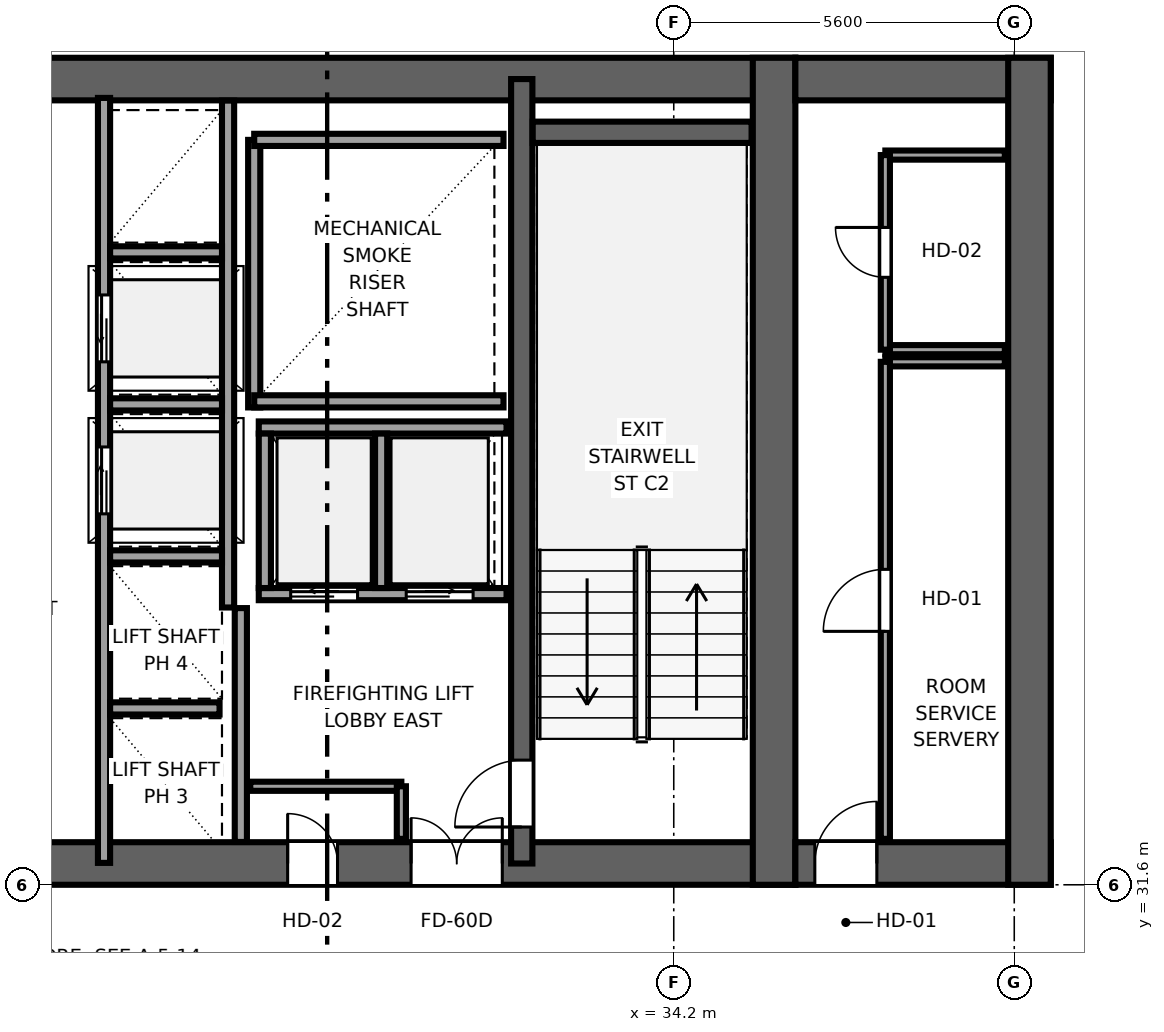
"""IFC4 building model, lengths in metres.
Left out: names, types, materials, properties, quantities, classifications, styles, units other than length and angle.
Written with IfcOpenShell. Run it as: python <this file> out.ifc"""

import sys

from ifc_helpers import new_model, si_unit, direction, frame, frame_2d, origin, place, context, subcontext, project, spatial, rectangle, extrude, source, transform, mapped, element, fill, save


model = new_model("IFC4")
c1 = context("Model", 3, precision=1e-05, world=origin(), true_north=direction((0.0, 1.0)))
c2 = subcontext(c1, "Body", "Model", "MODEL_VIEW")
j1 = project(units=[si_unit("LENGTHUNIT", "METRE"), si_unit("PLANEANGLEUNIT", "RADIAN")], contexts=[c1])
p1 = place(None, origin())
s1 = spatial("IfcSite", under=j1, at=p1, CompositionType="ELEMENT")
p2 = place(p1, origin())
s2 = spatial("IfcBuilding", under=s1, at=p2, CompositionType="ELEMENT")
p3 = place(p2, frame((0.0, 0.0, 201.75)))
s3 = spatial("IfcBuildingStorey", under=s2, at=p3, CompositionType="ELEMENT", Elevation=201.75)
p4 = place(p3, frame((9.8, 31.95, 0.0), z_axis=(0.0, 0.0, 1.0), x_axis=(1.0, 0.0, 0.0)))
e1 = element("IfcWall", 1, at=p4, inside=s3, PredefinedType="SHEAR", context=c2, shape_type="SweptSolid", body=[
    extrude(rectangle(XDim=26.4, YDim=0.7, at=frame_2d((13.2, 0.0))), origin(), (0.0, 0.0, 1.0), 3.55),
])
p5 = place(p4, frame((6.32, 0.0, 0.0), z_axis=(0.0, 0.0, 1.0), x_axis=(-1.0, 0.0, 0.0)))
e2 = element("IfcOpeningElement", 2, at=p5, cuts=e1, PredefinedType="OPENING", context=c2, shape_type="SweptSolid", body=[
    extrude(rectangle(XDim=1.5, YDim=2.04, at=frame_2d((0.75, 1.02))), frame((0.0, 0.36, 0.0), z_axis=(0.0, -1.0, 0.0), x_axis=(1.0, 0.0, 0.0)), (0.0, 0.0, 1.0), 0.72),
])
p6 = place(p4, frame((13.95, 0.0, 0.0), z_axis=(0.0, 0.0, 1.0), x_axis=(-1.0, 0.0, 0.0)))
e3 = element("IfcOpeningElement", 3, at=p6, cuts=e1, PredefinedType="OPENING", context=c2, shape_type="SweptSolid", body=[
    extrude(rectangle(XDim=1.5, YDim=2.04, at=frame_2d((0.75, 1.02))), frame((0.0, 0.36, 0.0), z_axis=(0.0, -1.0, 0.0), x_axis=(1.0, 0.0, 0.0)), (0.0, 0.0, 1.0), 0.72),
])
p7 = place(p4, frame((21.58, 0.0, 0.0), z_axis=(0.0, 0.0, 1.0), x_axis=(-1.0, 0.0, 0.0)))
e4 = element("IfcOpeningElement", 4, at=p7, cuts=e1, PredefinedType="OPENING", context=c2, shape_type="SweptSolid", body=[
    extrude(rectangle(XDim=1.5, YDim=2.04, at=frame_2d((0.75, 1.02))), frame((0.0, 0.36, 0.0), z_axis=(0.0, -1.0, 0.0), x_axis=(1.0, 0.0, 0.0)), (0.0, 0.0, 1.0), 0.72),
])
p8 = place(p4, frame((8.37, 0.0, 0.0), z_axis=(0.0, 0.0, 1.0), x_axis=(-1.0, 0.0, 0.0)))
e5 = element("IfcOpeningElement", 5, at=p8, cuts=e1, PredefinedType="OPENING", context=c2, shape_type="SweptSolid", body=[
    extrude(rectangle(XDim=0.82, YDim=2.01, at=frame_2d((0.41, 1.005))), frame((0.0, 0.36, 0.0), z_axis=(0.0, -1.0, 0.0), x_axis=(1.0, 0.0, 0.0)), (0.0, 0.0, 1.0), 0.72),
])
p9 = place(p4, frame((18.87, 0.0, 0.0), z_axis=(0.0, 0.0, 1.0), x_axis=(-1.0, 0.0, 0.0)))
e6 = element("IfcOpeningElement", 6, at=p9, cuts=e1, PredefinedType="OPENING", context=c2, shape_type="SweptSolid", body=[
    extrude(rectangle(XDim=0.82, YDim=2.01, at=frame_2d((0.41, 1.005))), frame((0.0, 0.36, 0.0), z_axis=(0.0, -1.0, 0.0), x_axis=(1.0, 0.0, 0.0)), (0.0, 0.0, 1.0), 0.72),
])
p10 = place(p3, frame((9.8, 44.85, 0.0), z_axis=(0.0, 0.0, 1.0), x_axis=(1.0, 0.0, 0.0)))
e7 = element("IfcWall", 7, at=p10, inside=s3, PredefinedType="SHEAR", context=c2, shape_type="SweptSolid", body=[
    extrude(rectangle(XDim=26.4, YDim=0.7, at=frame_2d((13.2, 0.0))), origin(), (0.0, 0.0, 1.0), 3.55),
])
p11 = place(p3, frame((35.85, 31.6, 0.0), z_axis=(0.0, 0.0, 1.0), x_axis=(0.0, 1.0, 0.0)))
e8 = element("IfcWall", 8, at=p11, inside=s3, PredefinedType="SHEAR", context=c2, shape_type="SweptSolid", body=[
    extrude(rectangle(XDim=13.6, YDim=0.7, at=frame_2d((6.8, 0.0))), origin(), (0.0, 0.0, 1.0), 3.55),
])
p12 = place(p3, frame((31.7, 31.95, 0.0), z_axis=(0.0, 0.0, 1.0), x_axis=(0.0, 1.0, 0.0)))
e9 = element("IfcWall", 9, at=p12, inside=s3, PredefinedType="SHEAR", context=c2, shape_type="SweptSolid", body=[
    extrude(rectangle(XDim=12.9, YDim=0.35, at=frame_2d((6.45, 0.0))), origin(), (0.0, 0.0, 1.0), 3.55),
])
p13 = place(p12, frame((1.7, 0.0, 0.0), z_axis=(0.0, 0.0, 1.0), x_axis=(-1.0, 0.0, 0.0)))
e10 = element("IfcOpeningElement", 10, at=p13, cuts=e9, PredefinedType="OPENING", context=c2, shape_type="SweptSolid", body=[
    extrude(rectangle(XDim=1.1, YDim=2.12, at=frame_2d((0.55, 1.06))), frame((0.0, 0.185, 0.0), z_axis=(0.0, -1.0, 0.0), x_axis=(1.0, 0.0, 0.0)), (0.0, 0.0, 1.0), 0.37),
])
p14 = place(p3, frame((36.2, 31.95, 0.0), z_axis=(0.0, 0.0, 1.0), x_axis=(1.0, 0.0, 0.0)))
e11 = element("IfcWall", 11, at=p14, inside=s3, PredefinedType="SHEAR", context=c2, shape_type="SweptSolid", body=[
    extrude(rectangle(XDim=4.2, YDim=0.7, at=frame_2d((2.1, 0.0))), origin(), (0.0, 0.0, 1.0), 3.55),
])
p15 = place(p14, frame((1.34, 0.0, 0.0), z_axis=(0.0, 0.0, 1.0), x_axis=(-1.0, 0.0, 0.0)))
e12 = element("IfcOpeningElement", 12, at=p15, cuts=e11, PredefinedType="OPENING", context=c2, shape_type="SweptSolid", body=[
    extrude(rectangle(XDim=1.02, YDim=2.03, at=frame_2d((0.51, 1.015))), frame((0.0, 0.36, 0.0), z_axis=(0.0, -1.0, 0.0), x_axis=(1.0, 0.0, 0.0)), (0.0, 0.0, 1.0), 0.72),
])
p16 = place(p3, frame((36.2, 44.85, 0.0), z_axis=(0.0, 0.0, 1.0), x_axis=(1.0, 0.0, 0.0)))
e13 = element("IfcWall", 13, at=p16, inside=s3, PredefinedType="SHEAR", context=c2, shape_type="SweptSolid", body=[
    extrude(rectangle(XDim=4.2, YDim=0.7, at=frame_2d((2.1, 0.0))), origin(), (0.0, 0.0, 1.0), 3.55),
])
p17 = place(p3, frame((40.05, 31.6, 0.0), z_axis=(0.0, 0.0, 1.0), x_axis=(0.0, 1.0, 0.0)))
e14 = element("IfcWall", 14, at=p17, inside=s3, PredefinedType="SHEAR", context=c2, shape_type="SweptSolid", body=[
    extrude(rectangle(XDim=13.6, YDim=0.7, at=frame_2d((6.8, 0.0))), origin(), (0.0, 0.0, 1.0), 3.55),
])
p18 = place(p3, frame((31.88, 43.975, 0.0), z_axis=(0.0, 0.0, 1.0), x_axis=(1.0, 0.0, 0.0)))
e15 = element("IfcWall", 15, at=p18, inside=s3, PredefinedType="SHEAR", context=c2, shape_type="SweptSolid", body=[
    extrude(rectangle(XDim=3.6, YDim=0.35, at=frame_2d((1.8, 0.0))), origin(), (0.0, 0.0, 1.0), 3.55),
])
p19 = place(p3, frame((27.3, 39.45, 0.0), z_axis=(0.0, 0.0, 1.0), x_axis=(0.0, 1.0, 0.0)))
e16 = element("IfcWall", 16, at=p19, inside=s3, PredefinedType="SOLIDWALL", context=c2, shape_type="SweptSolid", body=[
    extrude(rectangle(XDim=4.4, YDim=0.2, at=frame_2d((2.2, 0.0))), origin(), (0.0, 0.0, 1.0), 3.29),
])
for number, where, z_axis, x_axis in (
    (17, (27.3, 39.55, 0.0), (0.0, 0.0, 1.0), (1.0, 0.0, 0.0)),
    (18, (27.3, 43.85, 0.0), (0.0, 0.0, 1.0), (1.0, 0.0, 0.0)),
):
    element("IfcWall", number, at=place(p3, frame(where, z_axis=z_axis, x_axis=x_axis)), inside=s3, PredefinedType="SOLIDWALL", context=c2, shape_type="SweptSolid", body=[
        extrude(rectangle(XDim=4.1, YDim=0.2, at=frame_2d((2.05, 0.0))), origin(), (0.0, 0.0, 1.0), 3.29),
    ])
p20 = place(p3, frame((27.08, 32.304, 0.0), z_axis=(0.0, 0.0, 1.0), x_axis=(0.0, 1.0, 0.0)))
e19 = element("IfcWall", 19, at=p20, inside=s3, PredefinedType="SOLIDWALL", context=c2, shape_type="SweptSolid", body=[
    extrude(rectangle(XDim=3.846, YDim=0.2, at=frame_2d((1.923, 0.0))), origin(), (0.0, 0.0, 1.0), 3.29),
])
p21 = place(p3, frame((27.375, 36.38, 0.0), z_axis=(0.0, 0.0, 1.0), x_axis=(1.0, 0.0, 0.0)))
e20 = element("IfcWall", 20, at=p21, inside=s3, PredefinedType="SOLIDWALL", context=c2, shape_type="SweptSolid", body=[
    extrude(rectangle(XDim=4.075, YDim=0.2, at=frame_2d((2.038, 0.0))), origin(), (0.0, 0.0, 1.0), 3.29),
])
p22 = place(p21, frame((0.525, 0.0, 0.0)))
e21 = element("IfcOpeningElement", 21, at=p22, cuts=e20, PredefinedType="OPENING", context=c2, shape_type="SweptSolid", body=[
    extrude(rectangle(XDim=1.1, YDim=2.12, at=frame_2d((0.55, 1.06))), frame((0.0, 0.11, 0.0), z_axis=(0.0, -1.0, 0.0), x_axis=(1.0, 0.0, 0.0)), (0.0, 0.0, 1.0), 0.22),
])
p23 = place(p21, frame((2.425, 0.0, 0.0)))
e22 = element("IfcOpeningElement", 22, at=p23, cuts=e20, PredefinedType="OPENING", context=c2, shape_type="SweptSolid", body=[
    extrude(rectangle(XDim=1.1, YDim=2.12, at=frame_2d((0.55, 1.06))), frame((0.0, 0.11, 0.0), z_axis=(0.0, -1.0, 0.0), x_axis=(1.0, 0.0, 0.0)), (0.0, 0.0, 1.0), 0.22),
])
p24 = place(p3, frame((27.375, 39.12, 0.0), z_axis=(0.0, 0.0, 1.0), x_axis=(1.0, 0.0, 0.0)))
e23 = element("IfcWall", 23, at=p24, inside=s3, PredefinedType="SOLIDWALL", context=c2, shape_type="SweptSolid", body=[
    extrude(rectangle(XDim=4.075, YDim=0.2, at=frame_2d((2.038, 0.0))), origin(), (0.0, 0.0, 1.0), 3.29),
])
for number, where, z_axis, x_axis in (
    (24, (27.475, 36.48, 0.0), (0.0, 0.0, 1.0), (0.0, 1.0, 0.0)),
    (25, (29.387, 36.48, 0.0), (0.0, 0.0, 1.0), (0.0, 1.0, 0.0)),
):
    element("IfcWall", number, at=place(p3, frame(where, z_axis=z_axis, x_axis=x_axis)), inside=s3, PredefinedType="SOLIDWALL", context=c2, shape_type="SweptSolid", body=[
        extrude(rectangle(XDim=2.54, YDim=0.2, at=frame_2d((1.27, 0.0))), origin(), (0.0, 0.0, 1.0), 3.29),
    ])
p25 = place(p3, frame((24.83, 31.96, 0.0), z_axis=(0.0, 0.0, 1.0), x_axis=(0.0, 1.0, 0.0)))
e26 = element("IfcWall", 26, at=p25, inside=s3, PredefinedType="SOLIDWALL", context=c2, shape_type="SweptSolid", body=[
    extrude(rectangle(XDim=12.58, YDim=0.2, at=frame_2d((6.29, 0.0))), origin(), (0.0, 0.0, 1.0), 3.29),
])
p26 = place(p25, frame((5.74, 0.0, 0.0)))
e27 = element("IfcOpeningElement", 27, at=p26, cuts=e26, PredefinedType="OPENING", context=c2, shape_type="SweptSolid", body=[
    extrude(rectangle(XDim=1.1, YDim=2.12, at=frame_2d((0.55, 1.06))), frame((0.0, 0.11, 0.0), z_axis=(0.0, -1.0, 0.0), x_axis=(1.0, 0.0, 0.0)), (0.0, 0.0, 1.0), 0.22),
])
p27 = place(p25, frame((8.24, 0.0, 0.0)))
e28 = element("IfcOpeningElement", 28, at=p27, cuts=e26, PredefinedType="OPENING", context=c2, shape_type="SweptSolid", body=[
    extrude(rectangle(XDim=1.1, YDim=2.12, at=frame_2d((0.55, 1.06))), frame((0.0, 0.11, 0.0), z_axis=(0.0, -1.0, 0.0), x_axis=(1.0, 0.0, 0.0)), (0.0, 0.0, 1.0), 0.22),
])
p28 = place(p3, frame((26.87, 36.16, 0.0), z_axis=(0.0, 0.0, 1.0), x_axis=(0.0, 1.0, 0.0)))
e29 = element("IfcWall", 29, at=p28, inside=s3, PredefinedType="SOLIDWALL", context=c2, shape_type="SweptSolid", body=[
    extrude(rectangle(XDim=8.336, YDim=0.2, at=frame_2d((4.168, 0.0))), origin(), (0.0, 0.0, 1.0), 3.29),
])
p29 = place(p3, frame((24.93, 34.5, 0.0), z_axis=(0.0, 0.0, 1.0), x_axis=(1.0, 0.0, 0.0)))
e30 = element("IfcWall", 30, at=p29, inside=s3, PredefinedType="SOLIDWALL", context=c2, shape_type="SweptSolid", body=[
    extrude(rectangle(XDim=1.8, YDim=0.2, at=frame_2d((0.9, 0.0))), origin(), (0.0, 0.0, 1.0), 3.29),
])
for number, where, z_axis, x_axis in (
    (31, (24.93, 37.0, 0.0), (0.0, 0.0, 1.0), (1.0, 0.0, 0.0)),
    (32, (24.93, 39.5, 0.0), (0.0, 0.0, 1.0), (1.0, 0.0, 0.0)),
    (33, (24.93, 42.0, 0.0), (0.0, 0.0, 1.0), (1.0, 0.0, 0.0)),
):
    element("IfcWall", number, at=place(p3, frame(where, z_axis=z_axis, x_axis=x_axis)), inside=s3, PredefinedType="SOLIDWALL", context=c2, shape_type="SweptSolid", body=[
        extrude(rectangle(XDim=1.84, YDim=0.2, at=frame_2d((0.92, 0.0))), origin(), (0.0, 0.0, 1.0), 3.29),
    ])
p30 = place(p3, frame((27.235, 33.22, 0.0), z_axis=(0.0, 0.0, 1.0), x_axis=(1.0, 0.0, 0.0)))
e34 = element("IfcWall", 34, at=p30, inside=s3, PredefinedType="PARTITIONING", context=c2, shape_type="SweptSolid", body=[
    extrude(rectangle(XDim=2.485, YDim=0.15, at=frame_2d((1.242, 0.0))), origin(), (0.0, 0.0, 1.0), 3.29),
])
p31 = place(p3, frame((29.72, 32.355, 0.0), z_axis=(0.0, 0.0, 1.0), x_axis=(0.0, 1.0, 0.0)))
e35 = element("IfcWall", 35, at=p31, inside=s3, PredefinedType="PARTITIONING", context=c2, shape_type="SweptSolid", body=[
    extrude(rectangle(XDim=0.865, YDim=0.15, at=frame_2d((0.433, 0.0))), origin(), (0.0, 0.0, 1.0), 3.29),
])
p32 = place(p3, frame((37.68, 40.2, 0.0), z_axis=(0.0, 0.0, 1.0), x_axis=(1.0, 0.0, 0.0)))
e36 = element("IfcWall", 36, at=p32, inside=s3, PredefinedType="PARTITIONING", context=c2, shape_type="SweptSolid", body=[
    extrude(rectangle(XDim=1.965, YDim=0.15, at=frame_2d((0.982, 0.0))), origin(), (0.0, 0.0, 1.0), 3.29),
])
p33 = place(p3, frame((37.68, 32.355, 0.0), z_axis=(0.0, 0.0, 1.0), x_axis=(0.0, 1.0, 0.0)))
e37 = element("IfcWall", 37, at=p33, inside=s3, PredefinedType="PARTITIONING", context=c2, shape_type="SweptSolid", body=[
    extrude(rectangle(XDim=7.845, YDim=0.15, at=frame_2d((3.922, 0.0))), origin(), (0.0, 0.0, 1.0), 3.29),
])
p34 = place(p33, frame((3.413, 0.0, 0.0)))
e38 = element("IfcOpeningElement", 38, at=p34, cuts=e37, PredefinedType="OPENING", context=c2, shape_type="SweptSolid", body=[
    extrude(rectangle(XDim=1.02, YDim=2.03, at=frame_2d((0.51, 1.015))), frame((0.0, 0.085, 0.0), z_axis=(0.0, -1.0, 0.0), x_axis=(1.0, 0.0, 0.0)), (0.0, 0.0, 1.0), 0.17),
])
for number, where, z_axis, x_axis in (
    (39, (37.68, 40.4, 0.0), (0.0, 0.0, 1.0), (1.0, 0.0, 0.0)),
    (40, (37.68, 43.6, 0.0), (0.0, 0.0, 1.0), (1.0, 0.0, 0.0)),
):
    element("IfcWall", number, at=place(p3, frame(where, z_axis=z_axis, x_axis=x_axis)), inside=s3, PredefinedType="PARTITIONING", context=c2, shape_type="SweptSolid", body=[
        extrude(rectangle(XDim=1.965, YDim=0.15, at=frame_2d((0.982, 0.0))), origin(), (0.0, 0.0, 1.0), 3.29),
    ])
p35 = place(p3, frame((37.68, 40.4, 0.0), z_axis=(0.0, 0.0, 1.0), x_axis=(0.0, 1.0, 0.0)))
e41 = element("IfcWall", 41, at=p35, inside=s3, PredefinedType="PARTITIONING", context=c2, shape_type="SweptSolid", body=[
    extrude(rectangle(XDim=3.2, YDim=0.15, at=frame_2d((1.6, 0.0))), origin(), (0.0, 0.0, 1.0), 3.29),
])
p36 = place(p35, frame((1.19, 0.0, 0.0)))
e42 = element("IfcOpeningElement", 42, at=p36, cuts=e41, PredefinedType="OPENING", context=c2, shape_type="SweptSolid", body=[
    extrude(rectangle(XDim=0.82, YDim=2.01, at=frame_2d((0.41, 1.005))), frame((0.0, 0.085, 0.0), z_axis=(0.0, -1.0, 0.0), x_axis=(1.0, 0.0, 0.0)), (0.0, 0.0, 1.0), 0.17),
])
m1 = source(origin(), c2, "Body", "SweptSolid", [
    extrude(rectangle(XDim=1.1, YDim=2.12, at=frame_2d((0.55, 1.06))), frame((0.0, 0.025, 0.0), z_axis=(0.0, -1.0, 0.0), x_axis=(1.0, 0.0, 0.0)), (0.0, 0.0, 1.0), 0.05),
])
p37 = place(p13, origin())
e43 = element("IfcDoor", 43, at=p37, inside=s3, OperationType="SINGLE_SWING_LEFT", PredefinedType="DOOR", context=c2, shape_type="MappedRepresentation", body=[
    mapped(m1, transform((0.0, 0.0, 0.0), x_axis=(1.0, 0.0, 0.0), y_axis=(0.0, 1.0, 0.0), z_axis=(0.0, 0.0, 1.0), scale=1.0)),
])
fill(e10, e43)
m2 = source(origin(), c2, "Body", "SweptSolid", [
    extrude(rectangle(XDim=1.5, YDim=2.04, at=frame_2d((0.75, 1.02))), frame((0.0, 0.025, 0.0), z_axis=(0.0, -1.0, 0.0), x_axis=(1.0, 0.0, 0.0)), (0.0, 0.0, 1.0), 0.05),
])
p38 = place(p7, origin())
e44 = element("IfcDoor", 44, at=p38, inside=s3, OperationType="DOUBLE_DOOR_SINGLE_SWING", PredefinedType="DOOR", context=c2, shape_type="MappedRepresentation", body=[
    mapped(m2, transform((0.0, 0.0, 0.0), x_axis=(1.0, 0.0, 0.0), y_axis=(0.0, 1.0, 0.0), z_axis=(0.0, 0.0, 1.0), scale=1.0)),
])
fill(e4, e44)
m3 = source(origin(), c2, "Body", "SweptSolid", [
    extrude(rectangle(XDim=0.82, YDim=2.01, at=frame_2d((0.41, 1.005))), frame((0.0, 0.025, 0.0), z_axis=(0.0, -1.0, 0.0), x_axis=(1.0, 0.0, 0.0)), (0.0, 0.0, 1.0), 0.05),
])
p39 = place(p9, origin())
e45 = element("IfcDoor", 45, at=p39, inside=s3, OperationType="SINGLE_SWING_LEFT", PredefinedType="DOOR", context=c2, shape_type="MappedRepresentation", body=[
    mapped(m3, transform((0.0, 0.0, 0.0), x_axis=(1.0, 0.0, 0.0), y_axis=(0.0, 1.0, 0.0), z_axis=(0.0, 0.0, 1.0), scale=1.0)),
])
fill(e6, e45)
m4 = source(origin(), c2, "Body", "SweptSolid", [
    extrude(rectangle(XDim=1.02, YDim=2.03, at=frame_2d((0.51, 1.015))), frame((0.0, 0.025, 0.0), z_axis=(0.0, -1.0, 0.0), x_axis=(1.0, 0.0, 0.0)), (0.0, 0.0, 1.0), 0.05),
])
p40 = place(p15, origin())
e46 = element("IfcDoor", 46, at=p40, inside=s3, OperationType="SINGLE_SWING_RIGHT", PredefinedType="DOOR", context=c2, shape_type="MappedRepresentation", body=[
    mapped(m4, transform((0.0, 0.0, 0.0), x_axis=(1.0, 0.0, 0.0), y_axis=(0.0, 1.0, 0.0), z_axis=(0.0, 0.0, 1.0), scale=1.0)),
])
fill(e12, e46)
m5 = source(origin(), c2, "Body", "SweptSolid", [
    extrude(rectangle(XDim=1.1, YDim=2.12, at=frame_2d((0.55, 1.06))), frame((0.0, 0.025, 0.0), z_axis=(0.0, -1.0, 0.0), x_axis=(1.0, 0.0, 0.0)), (0.0, 0.0, 1.0), 0.05),
])
p41 = place(p22, origin())
e47 = element("IfcDoor", 47, at=p41, inside=s3, OperationType="SLIDING_TO_LEFT", PredefinedType="DOOR", context=c2, shape_type="MappedRepresentation", body=[
    mapped(m5, transform((0.0, 0.0, 0.0), x_axis=(1.0, 0.0, 0.0), y_axis=(0.0, 1.0, 0.0), z_axis=(0.0, 0.0, 1.0), scale=1.0)),
])
fill(e21, e47)
p42 = place(p23, origin())
e48 = element("IfcDoor", 48, at=p42, inside=s3, OperationType="SLIDING_TO_RIGHT", PredefinedType="DOOR", context=c2, shape_type="MappedRepresentation", body=[
    mapped(m5, transform((0.0, 0.0, 0.0), x_axis=(1.0, 0.0, 0.0), y_axis=(0.0, 1.0, 0.0), z_axis=(0.0, 0.0, 1.0), scale=1.0)),
])
fill(e22, e48)
p43 = place(p26, origin())
e49 = element("IfcDoor", 49, at=p43, inside=s3, OperationType="SLIDING_TO_RIGHT", PredefinedType="DOOR", context=c2, shape_type="MappedRepresentation", body=[
    mapped(m5, transform((0.0, 0.0, 0.0), x_axis=(1.0, 0.0, 0.0), y_axis=(0.0, 1.0, 0.0), z_axis=(0.0, 0.0, 1.0), scale=1.0)),
])
fill(e27, e49)
p44 = place(p27, origin())
e50 = element("IfcDoor", 50, at=p44, inside=s3, OperationType="SLIDING_TO_LEFT", PredefinedType="DOOR", context=c2, shape_type="MappedRepresentation", body=[
    mapped(m5, transform((0.0, 0.0, 0.0), x_axis=(1.0, 0.0, 0.0), y_axis=(0.0, 1.0, 0.0), z_axis=(0.0, 0.0, 1.0), scale=1.0)),
])
fill(e28, e50)
p45 = place(p34, origin())
e51 = element("IfcDoor", 51, at=p45, inside=s3, OperationType="SINGLE_SWING_LEFT", PredefinedType="DOOR", context=c2, shape_type="MappedRepresentation", body=[
    mapped(m4, transform((0.0, 0.0, 0.0), x_axis=(1.0, 0.0, 0.0), y_axis=(0.0, 1.0, 0.0), z_axis=(0.0, 0.0, 1.0), scale=1.0)),
])
fill(e38, e51)
p46 = place(p36, origin())
e52 = element("IfcDoor", 52, at=p46, inside=s3, OperationType="SINGLE_SWING_RIGHT", PredefinedType="DOOR", context=c2, shape_type="MappedRepresentation", body=[
    mapped(m3, transform((0.0, 0.0, 0.0), x_axis=(1.0, 0.0, 0.0), y_axis=(0.0, 1.0, 0.0), z_axis=(0.0, 0.0, 1.0), scale=1.0)),
])
fill(e42, e52)
save(model, sys.argv[1])
